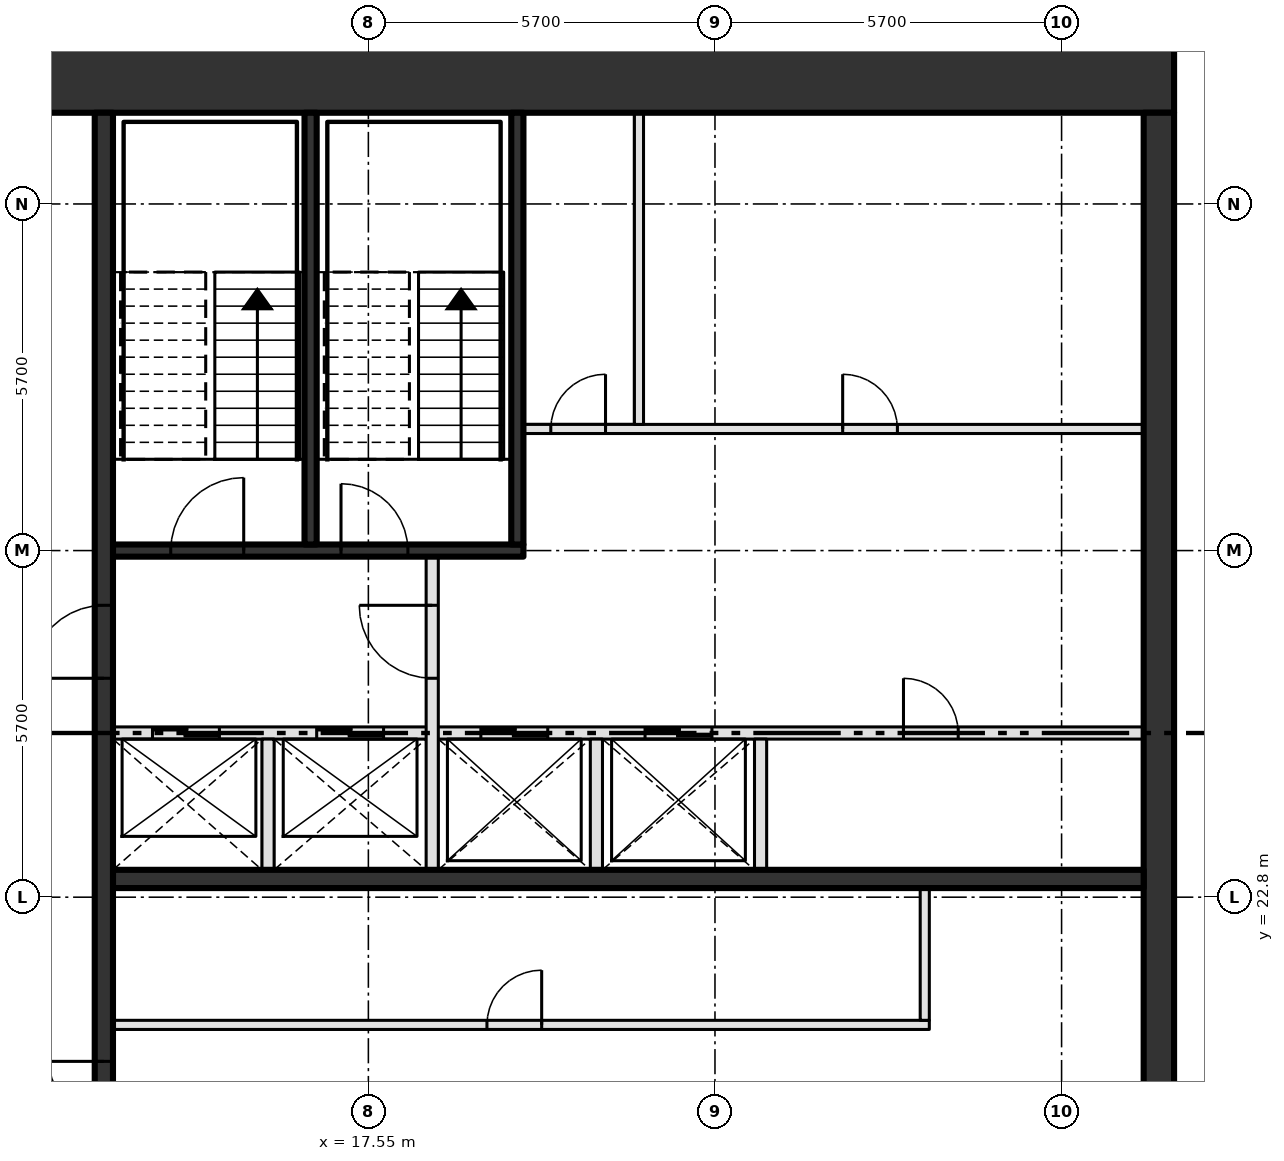
"""IFC4 building model, lengths in metres.
Left out: names, types, materials, properties, quantities, classifications, styles, units other than length and angle.
Written with IfcOpenShell. Run it as: python <this file> out.ifc"""

import sys

from ifc_helpers import new_model, si_unit, direction, frame, frame_2d, origin, place, context, subcontext, project, spatial, rectangle, extrude, element, fill, save


model = new_model("IFC4")
c1 = context("Model", 3, precision=1e-05, world=origin(), true_north=direction((0.0, 1.0)))
c2 = subcontext(c1, "Body", "Model", "MODEL_VIEW")
j1 = project(units=[si_unit("LENGTHUNIT", "METRE"), si_unit("PLANEANGLEUNIT", "RADIAN")], contexts=[c1])
p1 = place(None, origin())
s1 = spatial("IfcSite", under=j1, at=p1, CompositionType="ELEMENT")
p2 = place(p1, origin())
s2 = spatial("IfcBuilding", under=s1, at=p2, CompositionType="ELEMENT")
p3 = place(p2, frame((0.0, 0.0, 379.2)))
s3 = spatial("IfcBuildingStorey", under=s2, at=p3, CompositionType="ELEMENT", Elevation=379.2)
p4 = place(p3, frame((8.0, 36.3, -0.3), z_axis=(0.0, 0.0, 1.0), x_axis=(1.0, 0.0, 0.0)))
e1 = element("IfcWall", 1, at=p4, inside=s3, PredefinedType="SHEAR", context=c2, shape_type="SweptSolid", body=[
    extrude(rectangle(XDim=22.8, YDim=1.2, at=frame_2d((11.4, 0.0))), origin(), (0.0, 0.0, 1.0), 4.2),
])
p5 = place(p4, frame((2.3, 0.0, 0.3)))
e2 = element("IfcOpeningElement", 2, at=p5, cuts=e1, PredefinedType="OPENING", context=c2, shape_type="SweptSolid", body=[
    extrude(rectangle(XDim=1.8, YDim=2.1, at=frame_2d((0.9, 1.05))), frame((0.0, 0.61, 0.0), z_axis=(0.0, -1.0, 0.0), x_axis=(1.0, 0.0, 0.0)), (0.0, 0.0, 1.0), 1.22),
])
p6 = place(p3, frame((30.55, 14.6, -0.3), z_axis=(0.0, 0.0, 1.0), x_axis=(0.0, 1.0, 0.0)))
e3 = element("IfcWall", 3, at=p6, inside=s3, PredefinedType="SHEAR", context=c2, shape_type="SweptSolid", body=[
    extrude(rectangle(XDim=21.1, YDim=0.5, at=frame_2d((10.55, 0.0))), origin(), (0.0, 0.0, 1.0), 4.2),
])
p7 = place(p3, frame((13.35, 20.7, 0.0), z_axis=(0.0, 0.0, 1.0), x_axis=(1.0, 0.0, 0.0)))
e4 = element("IfcWall", 4, at=p7, inside=s3, PredefinedType="PARTITIONING", context=c2, shape_type="SweptSolid", body=[
    extrude(rectangle(XDim=13.425, YDim=0.15, at=frame_2d((6.712, 0.0))), origin(), (0.0, 0.0, 1.0), 3.9),
])
p8 = place(p7, frame((6.15, 0.0, 0.0)))
e5 = element("IfcOpeningElement", 5, at=p8, cuts=e4, PredefinedType="OPENING", context=c2, shape_type="SweptSolid", body=[
    extrude(rectangle(XDim=0.9, YDim=2.1, at=frame_2d((0.45, 1.05))), frame((0.0, 0.085, 0.0), z_axis=(0.0, -1.0, 0.0), x_axis=(1.0, 0.0, 0.0)), (0.0, 0.0, 1.0), 0.17),
])
p9 = place(p3, frame((13.35, 23.1, 0.0), z_axis=(0.0, 0.0, 1.0), x_axis=(1.0, 0.0, 0.0)))
e6 = element("IfcWall", 6, at=p9, inside=s3, PredefinedType="SHEAR", context=c2, shape_type="SweptSolid", body=[
    extrude(rectangle(XDim=16.95, YDim=0.3, at=frame_2d((8.475, 0.0))), origin(), (0.0, 0.0, 1.0), 3.9),
])
p10 = place(p3, frame((13.35, 25.5, 0.0), z_axis=(0.0, 0.0, 1.0), x_axis=(1.0, 0.0, 0.0)))
e7 = element("IfcWall", 7, at=p10, inside=s3, PredefinedType="SOLIDWALL", context=c2, shape_type="SweptSolid", body=[
    extrude(rectangle(XDim=16.95, YDim=0.2, at=frame_2d((8.475, 0.0))), origin(), (0.0, 0.0, 1.0), 3.9),
])
p11 = place(p10, frame((0.65, 0.0, 0.0)))
e8 = element("IfcOpeningElement", 8, at=p11, cuts=e7, PredefinedType="OPENING", context=c2, shape_type="SweptSolid", body=[
    extrude(rectangle(XDim=1.1, YDim=2.1, at=frame_2d((0.55, 1.05))), frame((0.0, 0.11, 0.0), z_axis=(0.0, -1.0, 0.0), x_axis=(1.0, 0.0, 0.0)), (0.0, 0.0, 1.0), 0.22),
])
p12 = place(p10, frame((3.35, 0.0, 0.0)))
e9 = element("IfcOpeningElement", 9, at=p12, cuts=e7, PredefinedType="OPENING", context=c2, shape_type="SweptSolid", body=[
    extrude(rectangle(XDim=1.1, YDim=2.1, at=frame_2d((0.55, 1.05))), frame((0.0, 0.11, 0.0), z_axis=(0.0, -1.0, 0.0), x_axis=(1.0, 0.0, 0.0)), (0.0, 0.0, 1.0), 0.22),
])
p13 = place(p10, frame((6.05, 0.0, 0.0)))
e10 = element("IfcOpeningElement", 10, at=p13, cuts=e7, PredefinedType="OPENING", context=c2, shape_type="SweptSolid", body=[
    extrude(rectangle(XDim=1.1, YDim=2.1, at=frame_2d((0.55, 1.05))), frame((0.0, 0.11, 0.0), z_axis=(0.0, -1.0, 0.0), x_axis=(1.0, 0.0, 0.0)), (0.0, 0.0, 1.0), 0.22),
])
p14 = place(p10, frame((8.75, 0.0, 0.0)))
e11 = element("IfcOpeningElement", 11, at=p14, cuts=e7, PredefinedType="OPENING", context=c2, shape_type="SweptSolid", body=[
    extrude(rectangle(XDim=1.1, YDim=2.1, at=frame_2d((0.55, 1.05))), frame((0.0, 0.11, 0.0), z_axis=(0.0, -1.0, 0.0), x_axis=(1.0, 0.0, 0.0)), (0.0, 0.0, 1.0), 0.22),
])
p15 = place(p10, frame((13.0, 0.0, 0.0)))
e12 = element("IfcOpeningElement", 12, at=p15, cuts=e7, PredefinedType="OPENING", context=c2, shape_type="SweptSolid", body=[
    extrude(rectangle(XDim=0.9, YDim=2.1, at=frame_2d((0.45, 1.05))), frame((0.0, 0.11, 0.0), z_axis=(0.0, -1.0, 0.0), x_axis=(1.0, 0.0, 0.0)), (0.0, 0.0, 1.0), 0.22),
])
p16 = place(p3, frame((13.35, 28.5, 0.0), z_axis=(0.0, 0.0, 1.0), x_axis=(1.0, 0.0, 0.0)))
e13 = element("IfcWall", 13, at=p16, inside=s3, PredefinedType="SOLIDWALL", context=c2, shape_type="SweptSolid", body=[
    extrude(rectangle(XDim=6.75, YDim=0.2, at=frame_2d((3.375, 0.0))), origin(), (0.0, 0.0, 1.0), 3.9),
])
p17 = place(p16, frame((0.95, 0.0, 0.0)))
e14 = element("IfcOpeningElement", 14, at=p17, cuts=e13, PredefinedType="OPENING", context=c2, shape_type="SweptSolid", body=[
    extrude(rectangle(XDim=1.2, YDim=2.1, at=frame_2d((0.6, 1.05))), frame((0.0, 0.11, 0.0), z_axis=(0.0, -1.0, 0.0), x_axis=(1.0, 0.0, 0.0)), (0.0, 0.0, 1.0), 0.22),
])
p18 = place(p16, frame((3.75, 0.0, 0.0)))
e15 = element("IfcOpeningElement", 15, at=p18, cuts=e13, PredefinedType="OPENING", context=c2, shape_type="SweptSolid", body=[
    extrude(rectangle(XDim=1.1, YDim=2.1, at=frame_2d((0.55, 1.05))), frame((0.0, 0.11, 0.0), z_axis=(0.0, -1.0, 0.0), x_axis=(1.0, 0.0, 0.0)), (0.0, 0.0, 1.0), 0.22),
])
p19 = place(p3, frame((20.1, 30.5, 0.0), z_axis=(0.0, 0.0, 1.0), x_axis=(1.0, 0.0, 0.0)))
e16 = element("IfcWall", 16, at=p19, inside=s3, PredefinedType="PARTITIONING", context=c2, shape_type="SweptSolid", body=[
    extrude(rectangle(XDim=10.2, YDim=0.15, at=frame_2d((5.1, 0.0))), origin(), (0.0, 0.0, 1.0), 3.9),
])
p20 = place(p19, frame((0.45, 0.0, 0.0)))
e17 = element("IfcOpeningElement", 17, at=p20, cuts=e16, PredefinedType="OPENING", context=c2, shape_type="SweptSolid", body=[
    extrude(rectangle(XDim=0.9, YDim=2.1, at=frame_2d((0.45, 1.05))), frame((0.0, 0.085, 0.0), z_axis=(0.0, -1.0, 0.0), x_axis=(1.0, 0.0, 0.0)), (0.0, 0.0, 1.0), 0.17),
])
p21 = place(p19, frame((5.25, 0.0, 0.0)))
e18 = element("IfcOpeningElement", 18, at=p21, cuts=e16, PredefinedType="OPENING", context=c2, shape_type="SweptSolid", body=[
    extrude(rectangle(XDim=0.9, YDim=2.1, at=frame_2d((0.45, 1.05))), frame((0.0, 0.085, 0.0), z_axis=(0.0, -1.0, 0.0), x_axis=(1.0, 0.0, 0.0)), (0.0, 0.0, 1.0), 0.17),
])
p22 = place(p3, frame((13.2, 14.6, 0.0), z_axis=(0.0, 0.0, 1.0), x_axis=(0.0, 1.0, 0.0)))
e19 = element("IfcWall", 19, at=p22, inside=s3, PredefinedType="SHEAR", context=c2, shape_type="SweptSolid", body=[
    extrude(rectangle(XDim=21.1, YDim=0.3, at=frame_2d((10.55, 0.0))), origin(), (0.0, 0.0, 1.0), 3.9),
])
p23 = place(p22, frame((3.7, 0.0, 0.0)))
e20 = element("IfcOpeningElement", 20, at=p23, cuts=e19, PredefinedType="OPENING", context=c2, shape_type="SweptSolid", body=[
    extrude(rectangle(XDim=1.8, YDim=2.1, at=frame_2d((0.9, 1.05))), frame((0.0, 0.16, 0.0), z_axis=(0.0, -1.0, 0.0), x_axis=(1.0, 0.0, 0.0)), (0.0, 0.0, 1.0), 0.32),
])
p24 = place(p22, frame((11.8, 0.0, 0.0)))
e21 = element("IfcOpeningElement", 21, at=p24, cuts=e19, PredefinedType="OPENING", context=c2, shape_type="SweptSolid", body=[
    extrude(rectangle(XDim=1.2, YDim=2.1, at=frame_2d((0.6, 1.05))), frame((0.0, 0.16, 0.0), z_axis=(0.0, -1.0, 0.0), x_axis=(1.0, 0.0, 0.0)), (0.0, 0.0, 1.0), 0.32),
])
p25 = place(p3, frame((15.9, 23.25, 0.0), z_axis=(0.0, 0.0, 1.0), x_axis=(0.0, 1.0, 0.0)))
e22 = element("IfcWall", 22, at=p25, inside=s3, PredefinedType="SOLIDWALL", context=c2, shape_type="SweptSolid", body=[
    extrude(rectangle(XDim=2.15, YDim=0.2, at=frame_2d((1.075, 0.0))), origin(), (0.0, 0.0, 1.0), 3.9),
])
p26 = place(p3, frame((16.6, 28.6, 0.0), z_axis=(0.0, 0.0, 1.0), x_axis=(0.0, 1.0, 0.0)))
e23 = element("IfcWall", 23, at=p26, inside=s3, PredefinedType="SOLIDWALL", context=c2, shape_type="SweptSolid", body=[
    extrude(rectangle(XDim=7.1, YDim=0.2, at=frame_2d((3.55, 0.0))), origin(), (0.0, 0.0, 1.0), 3.9),
])
p27 = place(p3, frame((18.6, 23.25, 0.0), z_axis=(0.0, 0.0, 1.0), x_axis=(0.0, 1.0, 0.0)))
e24 = element("IfcWall", 24, at=p27, inside=s3, PredefinedType="SOLIDWALL", context=c2, shape_type="SweptSolid", body=[
    extrude(rectangle(XDim=5.15, YDim=0.2, at=frame_2d((2.575, 0.0))), origin(), (0.0, 0.0, 1.0), 3.9),
])
p28 = place(p27, frame((3.15, 0.0, 0.0)))
e25 = element("IfcOpeningElement", 25, at=p28, cuts=e24, PredefinedType="OPENING", context=c2, shape_type="SweptSolid", body=[
    extrude(rectangle(XDim=1.2, YDim=2.1, at=frame_2d((0.6, 1.05))), frame((0.0, 0.11, 0.0), z_axis=(0.0, -1.0, 0.0), x_axis=(1.0, 0.0, 0.0)), (0.0, 0.0, 1.0), 0.22),
])
p29 = place(p3, frame((20.0, 28.6, 0.0), z_axis=(0.0, 0.0, 1.0), x_axis=(0.0, 1.0, 0.0)))
e26 = element("IfcWall", 26, at=p29, inside=s3, PredefinedType="SOLIDWALL", context=c2, shape_type="SweptSolid", body=[
    extrude(rectangle(XDim=7.1, YDim=0.2, at=frame_2d((3.55, 0.0))), origin(), (0.0, 0.0, 1.0), 3.9),
])
p30 = place(p3, frame((21.3, 23.25, 0.0), z_axis=(0.0, 0.0, 1.0), x_axis=(0.0, 1.0, 0.0)))
e27 = element("IfcWall", 27, at=p30, inside=s3, PredefinedType="SOLIDWALL", context=c2, shape_type="SweptSolid", body=[
    extrude(rectangle(XDim=2.15, YDim=0.2, at=frame_2d((1.075, 0.0))), origin(), (0.0, 0.0, 1.0), 3.9),
])
p31 = place(p3, frame((22.0, 30.575, 0.0), z_axis=(0.0, 0.0, 1.0), x_axis=(0.0, 1.0, 0.0)))
e28 = element("IfcWall", 28, at=p31, inside=s3, PredefinedType="PARTITIONING", context=c2, shape_type="SweptSolid", body=[
    extrude(rectangle(XDim=5.125, YDim=0.15, at=frame_2d((2.562, 0.0))), origin(), (0.0, 0.0, 1.0), 3.9),
])
p32 = place(p3, frame((24.0, 23.25, 0.0), z_axis=(0.0, 0.0, 1.0), x_axis=(0.0, 1.0, 0.0)))
e29 = element("IfcWall", 29, at=p32, inside=s3, PredefinedType="SOLIDWALL", context=c2, shape_type="SweptSolid", body=[
    extrude(rectangle(XDim=2.15, YDim=0.2, at=frame_2d((1.075, 0.0))), origin(), (0.0, 0.0, 1.0), 3.9),
])
p33 = place(p3, frame((26.7, 20.775, 0.0), z_axis=(0.0, 0.0, 1.0), x_axis=(0.0, 1.0, 0.0)))
e30 = element("IfcWall", 30, at=p33, inside=s3, PredefinedType="PARTITIONING", context=c2, shape_type="SweptSolid", body=[
    extrude(rectangle(XDim=2.175, YDim=0.15, at=frame_2d((1.087, 0.0))), origin(), (0.0, 0.0, 1.0), 3.9),
])
p34 = place(p11, origin())
e31 = element("IfcDoor", 31, at=p34, inside=s3, OperationType="SLIDING_TO_LEFT", PredefinedType="DOOR", context=c2, shape_type="SweptSolid", body=[
    extrude(rectangle(XDim=1.1, YDim=2.1, at=frame_2d((0.55, 1.05))), frame((0.0, 0.025, 0.0), z_axis=(0.0, -1.0, 0.0), x_axis=(1.0, 0.0, 0.0)), (0.0, 0.0, 1.0), 0.05),
])
fill(e8, e31)
p35 = place(p12, origin())
e32 = element("IfcDoor", 32, at=p35, inside=s3, OperationType="SLIDING_TO_LEFT", PredefinedType="DOOR", context=c2, shape_type="SweptSolid", body=[
    extrude(rectangle(XDim=1.1, YDim=2.1, at=frame_2d((0.55, 1.05))), frame((0.0, 0.025, 0.0), z_axis=(0.0, -1.0, 0.0), x_axis=(1.0, 0.0, 0.0)), (0.0, 0.0, 1.0), 0.05),
])
fill(e9, e32)
p36 = place(p13, origin())
e33 = element("IfcDoor", 33, at=p36, inside=s3, OperationType="SLIDING_TO_LEFT", PredefinedType="DOOR", context=c2, shape_type="SweptSolid", body=[
    extrude(rectangle(XDim=1.1, YDim=2.1, at=frame_2d((0.55, 1.05))), frame((0.0, 0.025, 0.0), z_axis=(0.0, -1.0, 0.0), x_axis=(1.0, 0.0, 0.0)), (0.0, 0.0, 1.0), 0.05),
])
fill(e10, e33)
p37 = place(p14, origin())
e34 = element("IfcDoor", 34, at=p37, inside=s3, OperationType="SLIDING_TO_LEFT", PredefinedType="DOOR", context=c2, shape_type="SweptSolid", body=[
    extrude(rectangle(XDim=1.1, YDim=2.1, at=frame_2d((0.55, 1.05))), frame((0.0, 0.025, 0.0), z_axis=(0.0, -1.0, 0.0), x_axis=(1.0, 0.0, 0.0)), (0.0, 0.0, 1.0), 0.05),
])
fill(e11, e34)
p38 = place(p8, origin())
e35 = element("IfcDoor", 35, at=p38, inside=s3, OperationType="SINGLE_SWING_RIGHT", PredefinedType="DOOR", context=c2, shape_type="SweptSolid", body=[
    extrude(rectangle(XDim=0.9, YDim=2.1, at=frame_2d((0.45, 1.05))), frame((0.0, 0.025, 0.0), z_axis=(0.0, -1.0, 0.0), x_axis=(1.0, 0.0, 0.0)), (0.0, 0.0, 1.0), 0.05),
])
fill(e5, e35)
p39 = place(p15, origin())
e36 = element("IfcDoor", 36, at=p39, inside=s3, OperationType="SINGLE_SWING_LEFT", PredefinedType="DOOR", context=c2, shape_type="SweptSolid", body=[
    extrude(rectangle(XDim=0.9, YDim=2.1, at=frame_2d((0.45, 1.05))), frame((0.0, 0.025, 0.0), z_axis=(0.0, -1.0, 0.0), x_axis=(1.0, 0.0, 0.0)), (0.0, 0.0, 1.0), 0.05),
])
fill(e12, e36)
p40 = place(p20, origin())
e37 = element("IfcDoor", 37, at=p40, inside=s3, OperationType="SINGLE_SWING_RIGHT", PredefinedType="DOOR", context=c2, shape_type="SweptSolid", body=[
    extrude(rectangle(XDim=0.9, YDim=2.1, at=frame_2d((0.45, 1.05))), frame((0.0, 0.025, 0.0), z_axis=(0.0, -1.0, 0.0), x_axis=(1.0, 0.0, 0.0)), (0.0, 0.0, 1.0), 0.05),
])
fill(e17, e37)
p41 = place(p21, origin())
e38 = element("IfcDoor", 38, at=p41, inside=s3, OperationType="SINGLE_SWING_LEFT", PredefinedType="DOOR", context=c2, shape_type="SweptSolid", body=[
    extrude(rectangle(XDim=0.9, YDim=2.1, at=frame_2d((0.45, 1.05))), frame((0.0, 0.025, 0.0), z_axis=(0.0, -1.0, 0.0), x_axis=(1.0, 0.0, 0.0)), (0.0, 0.0, 1.0), 0.05),
])
fill(e18, e38)
p42 = place(p17, origin())
e39 = element("IfcDoor", 39, at=p42, inside=s3, OperationType="SINGLE_SWING_RIGHT", PredefinedType="DOOR", context=c2, shape_type="SweptSolid", body=[
    extrude(rectangle(XDim=1.2, YDim=2.1, at=frame_2d((0.6, 1.05))), frame((0.0, 0.025, 0.0), z_axis=(0.0, -1.0, 0.0), x_axis=(1.0, 0.0, 0.0)), (0.0, 0.0, 1.0), 0.05),
])
fill(e14, e39)
p43 = place(p18, origin())
e40 = element("IfcDoor", 40, at=p43, inside=s3, OperationType="SINGLE_SWING_LEFT", PredefinedType="DOOR", context=c2, shape_type="SweptSolid", body=[
    extrude(rectangle(XDim=1.1, YDim=2.1, at=frame_2d((0.55, 1.05))), frame((0.0, 0.025, 0.0), z_axis=(0.0, -1.0, 0.0), x_axis=(1.0, 0.0, 0.0)), (0.0, 0.0, 1.0), 0.05),
])
fill(e15, e40)
p44 = place(p23, origin())
e41 = element("IfcDoor", 41, at=p44, inside=s3, OperationType="DOUBLE_DOOR_SINGLE_SWING", PredefinedType="DOOR", context=c2, shape_type="SweptSolid", body=[
    extrude(rectangle(XDim=1.8, YDim=2.1, at=frame_2d((0.9, 1.05))), frame((0.0, 0.025, 0.0), z_axis=(0.0, -1.0, 0.0), x_axis=(1.0, 0.0, 0.0)), (0.0, 0.0, 1.0), 0.05),
])
fill(e20, e41)
p45 = place(p24, origin())
e42 = element("IfcDoor", 42, at=p45, inside=s3, OperationType="SINGLE_SWING_LEFT", PredefinedType="DOOR", context=c2, shape_type="SweptSolid", body=[
    extrude(rectangle(XDim=1.2, YDim=2.1, at=frame_2d((0.6, 1.05))), frame((0.0, 0.025, 0.0), z_axis=(0.0, -1.0, 0.0), x_axis=(1.0, 0.0, 0.0)), (0.0, 0.0, 1.0), 0.05),
])
fill(e21, e42)
p46 = place(p28, origin())
e43 = element("IfcDoor", 43, at=p46, inside=s3, OperationType="SINGLE_SWING_RIGHT", PredefinedType="DOOR", context=c2, shape_type="SweptSolid", body=[
    extrude(rectangle(XDim=1.2, YDim=2.1, at=frame_2d((0.6, 1.05))), frame((0.0, 0.025, 0.0), z_axis=(0.0, -1.0, 0.0), x_axis=(1.0, 0.0, 0.0)), (0.0, 0.0, 1.0), 0.05),
])
fill(e25, e43)
save(model, sys.argv[1])
